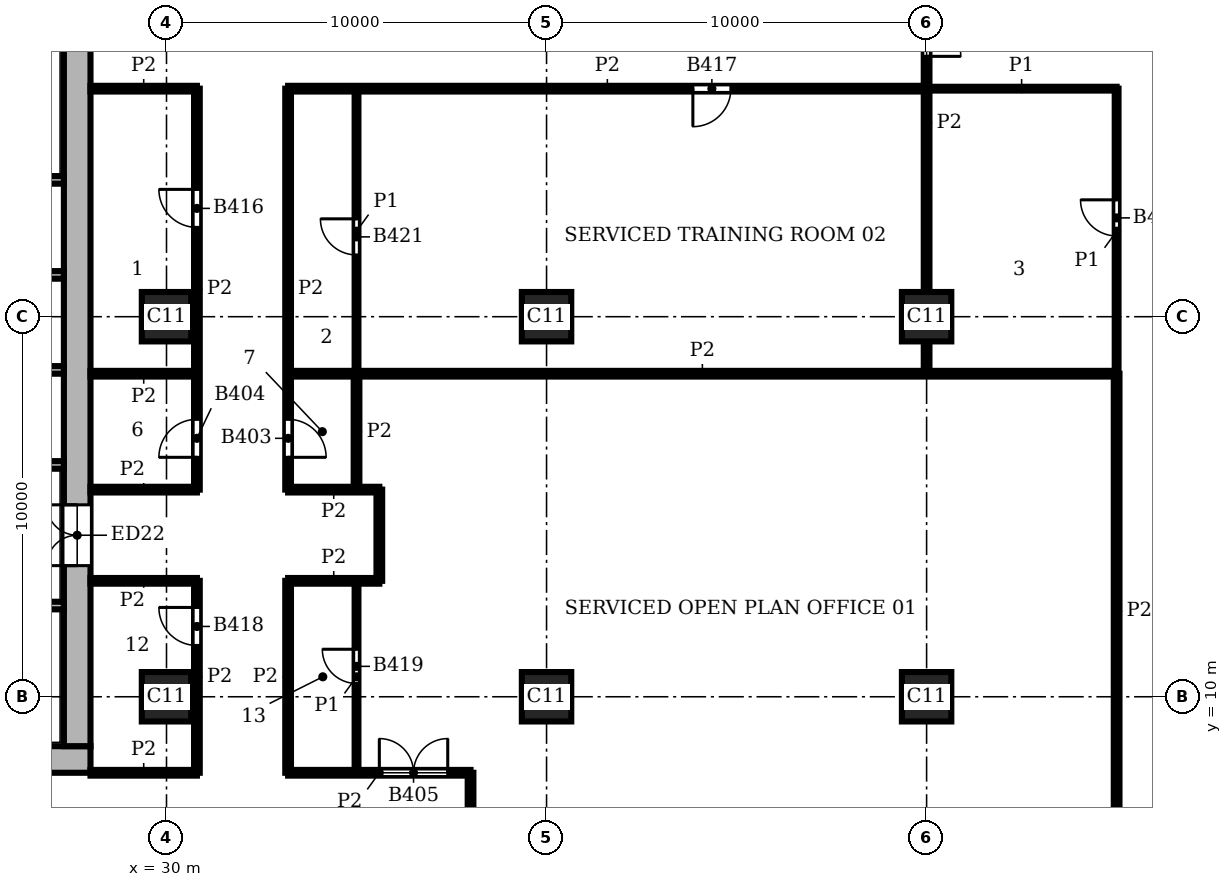
"""IFC4 building model, lengths in metres.
Left out: names, types, materials, properties, quantities, classifications, styles, units other than length and angle.
Written with IfcOpenShell. Run it as: python <this file> out.ifc"""

import sys

from ifc_helpers import new_model, si_unit, direction, frame, frame_2d, origin, origin_2d, place, context, subcontext, project, spatial, rectangle, extrude, element, fill, save


model = new_model("IFC4")
c1 = context("Model", 3, precision=1e-05, world=origin(), true_north=direction((0.0, 1.0)))
c2 = subcontext(c1, "Body", "Model", "MODEL_VIEW")
j1 = project(units=[si_unit("LENGTHUNIT", "METRE"), si_unit("PLANEANGLEUNIT", "RADIAN")], contexts=[c1])
p1 = place(None, origin())
s1 = spatial("IfcSite", under=j1, at=p1, CompositionType="ELEMENT")
p2 = place(p1, origin())
s2 = spatial("IfcBuilding", under=s1, at=p2, CompositionType="ELEMENT")
p3 = place(p2, frame((0.0, 0.0, 170.7)))
s3 = spatial("IfcBuildingStorey", under=s2, at=p3, CompositionType="ELEMENT", Elevation=170.7)
for number, where, z_axis, x_axis in (
    (1, (30.0, 10.0, 0.0), (0.0, 0.0, 1.0), (1.0, 0.0, 0.0)),
    (2, (30.0, 20.0, 0.0), (0.0, 0.0, 1.0), (1.0, 0.0, 0.0)),
    (3, (40.0, 10.0, 0.0), (0.0, 0.0, 1.0), (1.0, 0.0, 0.0)),
    (4, (40.0, 20.0, 0.0), (0.0, 0.0, 1.0), (1.0, 0.0, 0.0)),
    (5, (50.0, 10.0, 0.0), (0.0, 0.0, 1.0), (1.0, 0.0, 0.0)),
    (6, (50.0, 20.0, 0.0), (0.0, 0.0, 1.0), (1.0, 0.0, 0.0)),
):
    element("IfcColumn", number, at=place(p3, frame(where, z_axis=z_axis, x_axis=x_axis)), inside=s3, PredefinedType="COLUMN", context=c2, shape_type="SweptSolid", body=[
        extrude(rectangle(XDim=1.3, YDim=1.3, at=origin_2d()), origin(), (0.0, 0.0, 1.0), 3.9),
    ])
p4 = place(p3, frame((8.0, 8.35, 0.0), z_axis=(0.0, 0.0, 1.0), x_axis=(1.0, 0.0, 0.0)))
e7 = element("IfcWall", 7, at=p4, inside=s3, PredefinedType="SHEAR", context=c2, shape_type="SweptSolid", body=[
    extrude(rectangle(XDim=20.0, YDim=0.7, at=frame_2d((10.0, 0.0))), origin(), (0.0, 0.0, 1.0), 3.9),
])
p5 = place(p3, frame((27.65, 8.7, 0.0), z_axis=(0.0, 0.0, 1.0), x_axis=(0.0, 1.0, 0.0)))
e8 = element("IfcWall", 8, at=p5, inside=s3, PredefinedType="SHEAR", context=c2, shape_type="SweptSolid", body=[
    extrude(rectangle(XDim=18.6, YDim=0.7, at=frame_2d((9.3, 0.0))), origin(), (0.0, 0.0, 1.0), 3.9),
])
p6 = place(p5, frame((4.75, 0.0, 0.0)))
e9 = element("IfcOpeningElement", 9, at=p6, cuts=e8, PredefinedType="OPENING", context=c2, shape_type="SweptSolid", body=[
    extrude(rectangle(XDim=1.6, YDim=2.1, at=frame_2d((0.8, 1.05))), frame((0.0, 0.36, 0.0), z_axis=(0.0, -1.0, 0.0), x_axis=(1.0, 0.0, 0.0)), (0.0, 0.0, 1.0), 0.72),
])
p7 = place(p3, frame((13.8, 12.4, 0.0), z_axis=(0.0, 0.0, 1.0), x_axis=(1.0, 0.0, 0.0)))
e10 = element("IfcWall", 10, at=p7, inside=s3, PredefinedType="SHEAR", context=c2, shape_type="SweptSolid", body=[
    extrude(rectangle(XDim=13.5, YDim=0.2, at=frame_2d((6.75, 0.0))), origin(), (0.0, 0.0, 1.0), 3.58),
])
p8 = place(p7, frame((2.4, 0.0, 0.0)))
e11 = element("IfcOpeningElement", 11, at=p8, cuts=e10, PredefinedType="OPENING", context=c2, shape_type="SweptSolid", body=[
    extrude(rectangle(XDim=1.1, YDim=2.1, at=frame_2d((0.55, 1.05))), frame((0.0, 0.11, 0.0), z_axis=(0.0, -1.0, 0.0), x_axis=(1.0, 0.0, 0.0)), (0.0, 0.0, 1.0), 0.22),
])
p9 = place(p7, frame((4.9, 0.0, 0.0)))
e12 = element("IfcOpeningElement", 12, at=p9, cuts=e10, PredefinedType="OPENING", context=c2, shape_type="SweptSolid", body=[
    extrude(rectangle(XDim=1.1, YDim=2.1, at=frame_2d((0.55, 1.05))), frame((0.0, 0.11, 0.0), z_axis=(0.0, -1.0, 0.0), x_axis=(1.0, 0.0, 0.0)), (0.0, 0.0, 1.0), 0.22),
])
p10 = place(p7, frame((0.2, 0.0, 0.0)))
e13 = element("IfcOpeningElement", 13, at=p10, cuts=e10, PredefinedType="OPENING", context=c2, shape_type="SweptSolid", body=[
    extrude(rectangle(XDim=1.0, YDim=2.1, at=frame_2d((0.5, 1.05))), frame((0.0, 0.11, 0.0), z_axis=(0.0, -1.0, 0.0), x_axis=(1.0, 0.0, 0.0)), (0.0, 0.0, 1.0), 0.22),
])
for number, where, z_axis, x_axis in (
    (14, (24.3, 16.1, 0.0), (0.0, 0.0, 1.0), (1.0, 0.0, 0.0)),
    (15, (24.3, 18.6, 0.0), (0.0, 0.0, 1.0), (1.0, 0.0, 0.0)),
    (16, (24.3, 21.1, 0.0), (0.0, 0.0, 1.0), (1.0, 0.0, 0.0)),
):
    element("IfcWall", number, at=place(p3, frame(where, z_axis=z_axis, x_axis=x_axis)), inside=s3, PredefinedType="SHEAR", context=c2, shape_type="SweptSolid", body=[
        extrude(rectangle(XDim=3.0, YDim=0.2, at=frame_2d((1.5, 0.0))), origin(), (0.0, 0.0, 1.0), 3.58),
    ])
p11 = place(p3, frame((13.8, 23.6, 0.0), z_axis=(0.0, 0.0, 1.0), x_axis=(1.0, 0.0, 0.0)))
e17 = element("IfcWall", 17, at=p11, inside=s3, PredefinedType="SHEAR", context=c2, shape_type="SweptSolid", body=[
    extrude(rectangle(XDim=13.5, YDim=0.2, at=frame_2d((6.75, 0.0))), origin(), (0.0, 0.0, 1.0), 3.58),
])
p12 = place(p11, frame((2.4, 0.0, 0.0)))
e18 = element("IfcOpeningElement", 18, at=p12, cuts=e17, PredefinedType="OPENING", context=c2, shape_type="SweptSolid", body=[
    extrude(rectangle(XDim=1.1, YDim=2.1, at=frame_2d((0.55, 1.05))), frame((0.0, 0.11, 0.0), z_axis=(0.0, -1.0, 0.0), x_axis=(1.0, 0.0, 0.0)), (0.0, 0.0, 1.0), 0.22),
])
p13 = place(p11, frame((4.9, 0.0, 0.0)))
e19 = element("IfcOpeningElement", 19, at=p13, cuts=e17, PredefinedType="OPENING", context=c2, shape_type="SweptSolid", body=[
    extrude(rectangle(XDim=1.1, YDim=2.1, at=frame_2d((0.55, 1.05))), frame((0.0, 0.11, 0.0), z_axis=(0.0, -1.0, 0.0), x_axis=(1.0, 0.0, 0.0)), (0.0, 0.0, 1.0), 0.22),
])
p14 = place(p11, frame((0.2, 0.0, 0.0)))
e20 = element("IfcOpeningElement", 20, at=p14, cuts=e17, PredefinedType="OPENING", context=c2, shape_type="SweptSolid", body=[
    extrude(rectangle(XDim=1.0, YDim=2.1, at=frame_2d((0.5, 1.05))), frame((0.0, 0.11, 0.0), z_axis=(0.0, -1.0, 0.0), x_axis=(1.0, 0.0, 0.0)), (0.0, 0.0, 1.0), 0.22),
])
p15 = place(p3, frame((35.0, 8.0, 0.0), z_axis=(0.0, 0.0, 1.0), x_axis=(0.0, 1.0, 0.0)))
e21 = element("IfcWall", 21, at=p15, inside=s3, PredefinedType="PARTITIONING", context=c2, shape_type="SweptSolid", body=[
    extrude(rectangle(XDim=5.05, YDim=0.1, at=frame_2d((2.525, 0.0))), origin(), (0.0, 0.0, 1.0), 3.58),
])
p16 = place(p15, frame((2.35, 0.0, 0.0)))
e22 = element("IfcOpeningElement", 22, at=p16, cuts=e21, PredefinedType="OPENING", context=c2, shape_type="SweptSolid", body=[
    extrude(rectangle(XDim=0.9, YDim=2.1, at=frame_2d((0.45, 1.05))), frame((0.0, 0.06, 0.0), z_axis=(0.0, -1.0, 0.0), x_axis=(1.0, 0.0, 0.0)), (0.0, 0.0, 1.0), 0.12),
])
p17 = place(p3, frame((35.0, 18.5, 0.0), z_axis=(0.0, 0.0, 1.0), x_axis=(0.0, 1.0, 0.0)))
e23 = element("IfcWall", 23, at=p17, inside=s3, PredefinedType="PARTITIONING", context=c2, shape_type="SweptSolid", body=[
    extrude(rectangle(XDim=7.5, YDim=0.1, at=frame_2d((3.75, 0.0))), origin(), (0.0, 0.0, 1.0), 3.58),
])
p18 = place(p17, frame((3.125, 0.0, 0.0)))
e24 = element("IfcOpeningElement", 24, at=p18, cuts=e23, PredefinedType="OPENING", context=c2, shape_type="SweptSolid", body=[
    extrude(rectangle(XDim=0.95, YDim=2.1, at=frame_2d((0.475, 1.05))), frame((0.0, 0.06, 0.0), z_axis=(0.0, -1.0, 0.0), x_axis=(1.0, 0.0, 0.0)), (0.0, 0.0, 1.0), 0.12),
])
p19 = place(p3, frame((55.0, 18.5, 0.0), z_axis=(0.0, 0.0, 1.0), x_axis=(0.0, 1.0, 0.0)))
e25 = element("IfcWall", 25, at=p19, inside=s3, PredefinedType="PARTITIONING", context=c2, shape_type="SweptSolid", body=[
    extrude(rectangle(XDim=7.5, YDim=0.1, at=frame_2d((3.75, 0.0))), origin(), (0.0, 0.0, 1.0), 3.58),
])
p20 = place(p19, frame((3.625, 0.0, 0.0)))
e26 = element("IfcOpeningElement", 26, at=p20, cuts=e25, PredefinedType="OPENING", context=c2, shape_type="SweptSolid", body=[
    extrude(rectangle(XDim=0.95, YDim=2.1, at=frame_2d((0.475, 1.05))), frame((0.0, 0.06, 0.0), z_axis=(0.0, -1.0, 0.0), x_axis=(1.0, 0.0, 0.0)), (0.0, 0.0, 1.0), 0.12),
])
p21 = place(p3, frame((50.0, 26.0, 0.0), z_axis=(0.0, 0.0, 1.0), x_axis=(1.0, 0.0, 0.0)))
e27 = element("IfcWall", 27, at=p21, inside=s3, PredefinedType="PARTITIONING", context=c2, shape_type="SweptSolid", body=[
    extrude(rectangle(XDim=5.0, YDim=0.1, at=frame_2d((2.5, 0.0))), origin(), (0.0, 0.0, 1.0), 3.58),
])
p22 = place(p3, frame((30.8, 8.0, 0.0), z_axis=(0.0, 0.0, 1.0), x_axis=(0.0, 1.0, 0.0)))
e28 = element("IfcWall", 28, at=p22, inside=s3, PredefinedType="PARTITIONING", context=c2, shape_type="SweptSolid", body=[
    extrude(rectangle(XDim=5.05, YDim=0.15, at=frame_2d((2.525, 0.0))), origin(), (0.0, 0.0, 1.0), 3.58),
])
p23 = place(p22, frame((3.35, 0.0, 0.0)))
e29 = element("IfcOpeningElement", 29, at=p23, cuts=e28, PredefinedType="OPENING", context=c2, shape_type="SweptSolid", body=[
    extrude(rectangle(XDim=1.0, YDim=2.1, at=frame_2d((0.5, 1.05))), frame((0.0, 0.085, 0.0), z_axis=(0.0, -1.0, 0.0), x_axis=(1.0, 0.0, 0.0)), (0.0, 0.0, 1.0), 0.17),
])
p24 = place(p3, frame((30.8, 15.45, 0.0), z_axis=(0.0, 0.0, 1.0), x_axis=(0.0, 1.0, 0.0)))
e30 = element("IfcWall", 30, at=p24, inside=s3, PredefinedType="PARTITIONING", context=c2, shape_type="SweptSolid", body=[
    extrude(rectangle(XDim=10.55, YDim=0.15, at=frame_2d((5.275, 0.0))), origin(), (0.0, 0.0, 1.0), 3.58),
])
p25 = place(p24, frame((0.85, 0.0, 0.0)))
e31 = element("IfcOpeningElement", 31, at=p25, cuts=e30, PredefinedType="OPENING", context=c2, shape_type="SweptSolid", body=[
    extrude(rectangle(XDim=1.0, YDim=2.1, at=frame_2d((0.5, 1.05))), frame((0.0, 0.085, 0.0), z_axis=(0.0, -1.0, 0.0), x_axis=(1.0, 0.0, 0.0)), (0.0, 0.0, 1.0), 0.17),
])
p26 = place(p24, frame((6.9, 0.0, 0.0)))
e32 = element("IfcOpeningElement", 32, at=p26, cuts=e30, PredefinedType="OPENING", context=c2, shape_type="SweptSolid", body=[
    extrude(rectangle(XDim=1.0, YDim=2.1, at=frame_2d((0.5, 1.05))), frame((0.0, 0.085, 0.0), z_axis=(0.0, -1.0, 0.0), x_axis=(1.0, 0.0, 0.0)), (0.0, 0.0, 1.0), 0.17),
])
p27 = place(p3, frame((33.2, 8.0, 0.0), z_axis=(0.0, 0.0, 1.0), x_axis=(0.0, 1.0, 0.0)))
e33 = element("IfcWall", 33, at=p27, inside=s3, PredefinedType="PARTITIONING", context=c2, shape_type="SweptSolid", body=[
    extrude(rectangle(XDim=5.05, YDim=0.15, at=frame_2d((2.525, 0.0))), origin(), (0.0, 0.0, 1.0), 3.58),
])
p28 = place(p3, frame((33.2, 15.45, 0.0), z_axis=(0.0, 0.0, 1.0), x_axis=(0.0, 1.0, 0.0)))
e34 = element("IfcWall", 34, at=p28, inside=s3, PredefinedType="PARTITIONING", context=c2, shape_type="SweptSolid", body=[
    extrude(rectangle(XDim=10.55, YDim=0.15, at=frame_2d((5.275, 0.0))), origin(), (0.0, 0.0, 1.0), 3.58),
])
p29 = place(p28, frame((0.85, 0.0, 0.0)))
e35 = element("IfcOpeningElement", 35, at=p29, cuts=e34, PredefinedType="OPENING", context=c2, shape_type="SweptSolid", body=[
    extrude(rectangle(XDim=1.0, YDim=2.1, at=frame_2d((0.5, 1.05))), frame((0.0, 0.085, 0.0), z_axis=(0.0, -1.0, 0.0), x_axis=(1.0, 0.0, 0.0)), (0.0, 0.0, 1.0), 0.17),
])
p30 = place(p3, frame((35.0, 15.45, 0.0), z_axis=(0.0, 0.0, 1.0), x_axis=(0.0, 1.0, 0.0)))
e36 = element("IfcWall", 36, at=p30, inside=s3, PredefinedType="PARTITIONING", context=c2, shape_type="SweptSolid", body=[
    extrude(rectangle(XDim=3.05, YDim=0.15, at=frame_2d((1.525, 0.0))), origin(), (0.0, 0.0, 1.0), 3.58),
])
p31 = place(p3, frame((35.6, 13.05, 0.0), z_axis=(0.0, 0.0, 1.0), x_axis=(0.0, 1.0, 0.0)))
e37 = element("IfcWall", 37, at=p31, inside=s3, PredefinedType="PARTITIONING", context=c2, shape_type="SweptSolid", body=[
    extrude(rectangle(XDim=2.4, YDim=0.15, at=frame_2d((1.2, 0.0))), origin(), (0.0, 0.0, 1.0), 3.58),
])
p32 = place(p3, frame((38.0, 4.5, 0.0), z_axis=(0.0, 0.0, 1.0), x_axis=(0.0, 1.0, 0.0)))
e38 = element("IfcWall", 38, at=p32, inside=s3, PredefinedType="PARTITIONING", context=c2, shape_type="SweptSolid", body=[
    extrude(rectangle(XDim=3.5, YDim=0.15, at=frame_2d((1.75, 0.0))), origin(), (0.0, 0.0, 1.0), 3.58),
])
p33 = place(p3, frame((50.0, 18.5, 0.0), z_axis=(0.0, 0.0, 1.0), x_axis=(0.0, 1.0, 0.0)))
e39 = element("IfcWall", 39, at=p33, inside=s3, PredefinedType="PARTITIONING", context=c2, shape_type="SweptSolid", body=[
    extrude(rectangle(XDim=0.85, YDim=0.15, at=frame_2d((0.425, 0.0))), origin(), (0.0, 0.0, 1.0), 3.58),
])
p34 = place(p3, frame((50.0, 20.65, 0.0), z_axis=(0.0, 0.0, 1.0), x_axis=(0.0, 1.0, 0.0)))
e40 = element("IfcWall", 40, at=p34, inside=s3, PredefinedType="PARTITIONING", context=c2, shape_type="SweptSolid", body=[
    extrude(rectangle(XDim=8.9, YDim=0.15, at=frame_2d((4.45, 0.0))), origin(), (0.0, 0.0, 1.0), 3.58),
])
p35 = place(p34, frame((6.2, 0.0, 0.0)))
e41 = element("IfcOpeningElement", 41, at=p35, cuts=e40, PredefinedType="OPENING", context=c2, shape_type="SweptSolid", body=[
    extrude(rectangle(XDim=1.8, YDim=2.1, at=frame_2d((0.9, 1.05))), frame((0.0, 0.085, 0.0), z_axis=(0.0, -1.0, 0.0), x_axis=(1.0, 0.0, 0.0)), (0.0, 0.0, 1.0), 0.17),
])
p36 = place(p3, frame((55.0, 6.0, 0.0), z_axis=(0.0, 0.0, 1.0), x_axis=(0.0, 1.0, 0.0)))
e42 = element("IfcWall", 42, at=p36, inside=s3, PredefinedType="PARTITIONING", context=c2, shape_type="SweptSolid", body=[
    extrude(rectangle(XDim=12.5, YDim=0.15, at=frame_2d((6.25, 0.0))), origin(), (0.0, 0.0, 1.0), 3.58),
])
p37 = place(p3, frame((28.0, 8.0, 0.0), z_axis=(0.0, 0.0, 1.0), x_axis=(1.0, 0.0, 0.0)))
e43 = element("IfcWall", 43, at=p37, inside=s3, PredefinedType="PARTITIONING", context=c2, shape_type="SweptSolid", body=[
    extrude(rectangle(XDim=2.8, YDim=0.15, at=frame_2d((1.4, 0.0))), origin(), (0.0, 0.0, 1.0), 3.58),
])
p38 = place(p3, frame((33.2, 8.0, 0.0), z_axis=(0.0, 0.0, 1.0), x_axis=(1.0, 0.0, 0.0)))
e44 = element("IfcWall", 44, at=p38, inside=s3, PredefinedType="PARTITIONING", context=c2, shape_type="SweptSolid", body=[
    extrude(rectangle(XDim=4.8, YDim=0.15, at=frame_2d((2.4, 0.0))), origin(), (0.0, 0.0, 1.0), 3.58),
])
p39 = place(p38, frame((2.4, 0.0, 0.0)))
e45 = element("IfcOpeningElement", 45, at=p39, cuts=e44, PredefinedType="OPENING", context=c2, shape_type="SweptSolid", body=[
    extrude(rectangle(XDim=1.8, YDim=2.1, at=frame_2d((0.9, 1.05))), frame((0.0, 0.085, 0.0), z_axis=(0.0, -1.0, 0.0), x_axis=(1.0, 0.0, 0.0)), (0.0, 0.0, 1.0), 0.17),
])
p40 = place(p3, frame((28.0, 13.05, 0.0), z_axis=(0.0, 0.0, 1.0), x_axis=(1.0, 0.0, 0.0)))
e46 = element("IfcWall", 46, at=p40, inside=s3, PredefinedType="PARTITIONING", context=c2, shape_type="SweptSolid", body=[
    extrude(rectangle(XDim=2.8, YDim=0.15, at=frame_2d((1.4, 0.0))), origin(), (0.0, 0.0, 1.0), 3.58),
])
p41 = place(p3, frame((33.2, 13.05, 0.0), z_axis=(0.0, 0.0, 1.0), x_axis=(1.0, 0.0, 0.0)))
e47 = element("IfcWall", 47, at=p41, inside=s3, PredefinedType="PARTITIONING", context=c2, shape_type="SweptSolid", body=[
    extrude(rectangle(XDim=2.4, YDim=0.15, at=frame_2d((1.2, 0.0))), origin(), (0.0, 0.0, 1.0), 3.58),
])
p42 = place(p3, frame((28.0, 15.45, 0.0), z_axis=(0.0, 0.0, 1.0), x_axis=(1.0, 0.0, 0.0)))
e48 = element("IfcWall", 48, at=p42, inside=s3, PredefinedType="PARTITIONING", context=c2, shape_type="SweptSolid", body=[
    extrude(rectangle(XDim=2.8, YDim=0.15, at=frame_2d((1.4, 0.0))), origin(), (0.0, 0.0, 1.0), 3.58),
])
p43 = place(p3, frame((33.2, 15.45, 0.0), z_axis=(0.0, 0.0, 1.0), x_axis=(1.0, 0.0, 0.0)))
e49 = element("IfcWall", 49, at=p43, inside=s3, PredefinedType="PARTITIONING", context=c2, shape_type="SweptSolid", body=[
    extrude(rectangle(XDim=2.4, YDim=0.15, at=frame_2d((1.2, 0.0))), origin(), (0.0, 0.0, 1.0), 3.58),
])
p44 = place(p3, frame((28.0, 18.5, 0.0), z_axis=(0.0, 0.0, 1.0), x_axis=(1.0, 0.0, 0.0)))
e50 = element("IfcWall", 50, at=p44, inside=s3, PredefinedType="PARTITIONING", context=c2, shape_type="SweptSolid", body=[
    extrude(rectangle(XDim=2.8, YDim=0.15, at=frame_2d((1.4, 0.0))), origin(), (0.0, 0.0, 1.0), 3.58),
])
p45 = place(p3, frame((33.2, 18.5, 0.0), z_axis=(0.0, 0.0, 1.0), x_axis=(1.0, 0.0, 0.0)))
e51 = element("IfcWall", 51, at=p45, inside=s3, PredefinedType="PARTITIONING", context=c2, shape_type="SweptSolid", body=[
    extrude(rectangle(XDim=21.8, YDim=0.15, at=frame_2d((10.9, 0.0))), origin(), (0.0, 0.0, 1.0), 3.58),
])
p46 = place(p3, frame((28.0, 26.0, 0.0), z_axis=(0.0, 0.0, 1.0), x_axis=(1.0, 0.0, 0.0)))
e52 = element("IfcWall", 52, at=p46, inside=s3, PredefinedType="PARTITIONING", context=c2, shape_type="SweptSolid", body=[
    extrude(rectangle(XDim=2.8, YDim=0.15, at=frame_2d((1.4, 0.0))), origin(), (0.0, 0.0, 1.0), 3.58),
])
p47 = place(p3, frame((33.2, 26.0, 0.0), z_axis=(0.0, 0.0, 1.0), x_axis=(1.0, 0.0, 0.0)))
e53 = element("IfcWall", 53, at=p47, inside=s3, PredefinedType="PARTITIONING", context=c2, shape_type="SweptSolid", body=[
    extrude(rectangle(XDim=16.8, YDim=0.15, at=frame_2d((8.4, 0.0))), origin(), (0.0, 0.0, 1.0), 3.58),
])
p48 = place(p47, frame((10.65, 0.0, 0.0)))
e54 = element("IfcOpeningElement", 54, at=p48, cuts=e53, PredefinedType="OPENING", context=c2, shape_type="SweptSolid", body=[
    extrude(rectangle(XDim=1.0, YDim=2.1, at=frame_2d((0.5, 1.05))), frame((0.0, 0.085, 0.0), z_axis=(0.0, -1.0, 0.0), x_axis=(1.0, 0.0, 0.0)), (0.0, 0.0, 1.0), 0.17),
])
p49 = place(p6, origin())
e55 = element("IfcDoor", 55, at=p49, inside=s3, OperationType="DOUBLE_DOOR_SINGLE_SWING", PredefinedType="DOOR", context=c2, shape_type="SweptSolid", body=[
    extrude(rectangle(XDim=1.6, YDim=2.1, at=frame_2d((0.8, 1.05))), frame((0.0, 0.025, 0.0), z_axis=(0.0, -1.0, 0.0), x_axis=(1.0, 0.0, 0.0)), (0.0, 0.0, 1.0), 0.05),
])
fill(e9, e55)
p50 = place(p29, frame((1.0, 0.0, 0.0), z_axis=(0.0, 0.0, 1.0), x_axis=(-1.0, 0.0, 0.0)))
e56 = element("IfcDoor", 56, at=p50, inside=s3, OperationType="SINGLE_SWING_RIGHT", PredefinedType="DOOR", context=c2, shape_type="SweptSolid", body=[
    extrude(rectangle(XDim=1.0, YDim=2.1, at=frame_2d((0.5, 1.05))), frame((0.0, 0.025, 0.0), z_axis=(0.0, -1.0, 0.0), x_axis=(1.0, 0.0, 0.0)), (0.0, 0.0, 1.0), 0.05),
])
fill(e35, e56)
p51 = place(p25, origin())
e57 = element("IfcDoor", 57, at=p51, inside=s3, OperationType="SINGLE_SWING_LEFT", PredefinedType="DOOR", context=c2, shape_type="SweptSolid", body=[
    extrude(rectangle(XDim=1.0, YDim=2.1, at=frame_2d((0.5, 1.05))), frame((0.0, 0.025, 0.0), z_axis=(0.0, -1.0, 0.0), x_axis=(1.0, 0.0, 0.0)), (0.0, 0.0, 1.0), 0.05),
])
fill(e31, e57)
p52 = place(p39, origin())
e58 = element("IfcDoor", 58, at=p52, inside=s3, OperationType="DOUBLE_DOOR_SINGLE_SWING", PredefinedType="DOOR", context=c2, shape_type="SweptSolid", body=[
    extrude(rectangle(XDim=1.8, YDim=2.1, at=frame_2d((0.9, 1.05))), frame((0.0, 0.025, 0.0), z_axis=(0.0, -1.0, 0.0), x_axis=(1.0, 0.0, 0.0)), (0.0, 0.0, 1.0), 0.05),
])
fill(e45, e58)
p53 = place(p35, frame((1.8, 0.0, 0.0), z_axis=(0.0, 0.0, 1.0), x_axis=(-1.0, 0.0, 0.0)))
e59 = element("IfcDoor", 59, at=p53, inside=s3, OperationType="DOUBLE_DOOR_SINGLE_SWING", PredefinedType="DOOR", context=c2, shape_type="SweptSolid", body=[
    extrude(rectangle(XDim=1.8, YDim=2.1, at=frame_2d((0.9, 1.05))), frame((0.0, 0.025, 0.0), z_axis=(0.0, -1.0, 0.0), x_axis=(1.0, 0.0, 0.0)), (0.0, 0.0, 1.0), 0.05),
])
fill(e41, e59)
p54 = place(p26, origin())
e60 = element("IfcDoor", 60, at=p54, inside=s3, OperationType="SINGLE_SWING_RIGHT", PredefinedType="DOOR", context=c2, shape_type="SweptSolid", body=[
    extrude(rectangle(XDim=1.0, YDim=2.1, at=frame_2d((0.5, 1.05))), frame((0.0, 0.025, 0.0), z_axis=(0.0, -1.0, 0.0), x_axis=(1.0, 0.0, 0.0)), (0.0, 0.0, 1.0), 0.05),
])
fill(e32, e60)
p55 = place(p48, frame((1.0, 0.0, 0.0), z_axis=(0.0, 0.0, 1.0), x_axis=(-1.0, 0.0, 0.0)))
e61 = element("IfcDoor", 61, at=p55, inside=s3, OperationType="SINGLE_SWING_RIGHT", PredefinedType="DOOR", context=c2, shape_type="SweptSolid", body=[
    extrude(rectangle(XDim=1.0, YDim=2.1, at=frame_2d((0.5, 1.05))), frame((0.0, 0.025, 0.0), z_axis=(0.0, -1.0, 0.0), x_axis=(1.0, 0.0, 0.0)), (0.0, 0.0, 1.0), 0.05),
])
fill(e54, e61)
p56 = place(p23, origin())
e62 = element("IfcDoor", 62, at=p56, inside=s3, OperationType="SINGLE_SWING_RIGHT", PredefinedType="DOOR", context=c2, shape_type="SweptSolid", body=[
    extrude(rectangle(XDim=1.0, YDim=2.1, at=frame_2d((0.5, 1.05))), frame((0.0, 0.025, 0.0), z_axis=(0.0, -1.0, 0.0), x_axis=(1.0, 0.0, 0.0)), (0.0, 0.0, 1.0), 0.05),
])
fill(e29, e62)
p57 = place(p16, origin())
e63 = element("IfcDoor", 63, at=p57, inside=s3, OperationType="SINGLE_SWING_RIGHT", PredefinedType="DOOR", context=c2, shape_type="SweptSolid", body=[
    extrude(rectangle(XDim=0.9, YDim=2.1, at=frame_2d((0.45, 1.05))), frame((0.0, 0.025, 0.0), z_axis=(0.0, -1.0, 0.0), x_axis=(1.0, 0.0, 0.0)), (0.0, 0.0, 1.0), 0.05),
])
fill(e22, e63)
p58 = place(p18, origin())
e64 = element("IfcDoor", 64, at=p58, inside=s3, OperationType="SINGLE_SWING_RIGHT", PredefinedType="DOOR", context=c2, shape_type="SweptSolid", body=[
    extrude(rectangle(XDim=0.95, YDim=2.1, at=frame_2d((0.475, 1.05))), frame((0.0, 0.025, 0.0), z_axis=(0.0, -1.0, 0.0), x_axis=(1.0, 0.0, 0.0)), (0.0, 0.0, 1.0), 0.05),
])
fill(e24, e64)
p59 = place(p20, origin())
e65 = element("IfcDoor", 65, at=p59, inside=s3, OperationType="SINGLE_SWING_RIGHT", PredefinedType="DOOR", context=c2, shape_type="SweptSolid", body=[
    extrude(rectangle(XDim=0.95, YDim=2.1, at=frame_2d((0.475, 1.05))), frame((0.0, 0.025, 0.0), z_axis=(0.0, -1.0, 0.0), x_axis=(1.0, 0.0, 0.0)), (0.0, 0.0, 1.0), 0.05),
])
fill(e26, e65)
save(model, sys.argv[1])
